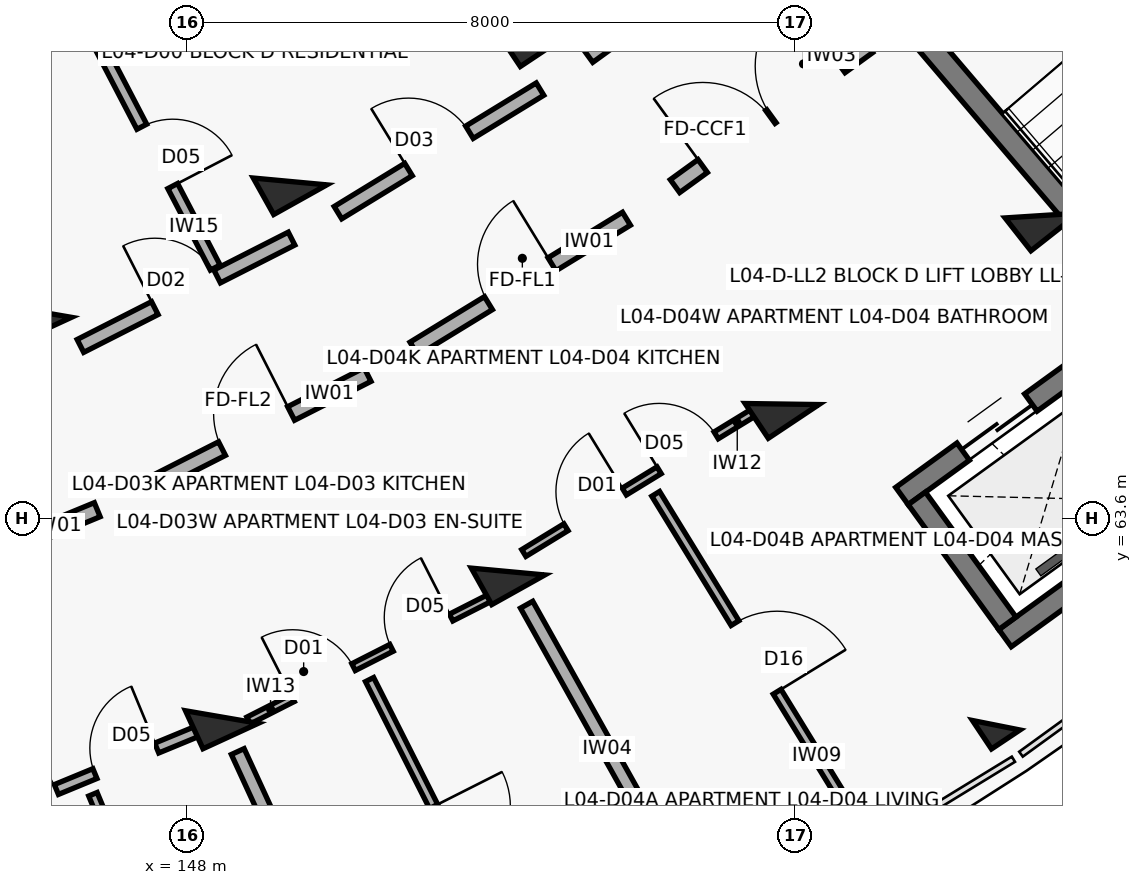
"""IFC4 building model, lengths in metres.
Left out: names, types, materials, properties, quantities, classifications, styles, units other than length and angle.
Written with IfcOpenShell. Run it as: python <this file> out.ifc"""

import sys

from ifc_helpers import new_model, si_unit, direction, frame, frame_2d, origin, origin_2d, place, context, subcontext, project, spatial, rectangle, extrude, element, fill, save


model = new_model("IFC4")
c1 = context("Model", 3, precision=1e-05, world=origin(), true_north=direction((0.0, 1.0)))
c2 = subcontext(c1, "Body", "Model", "MODEL_VIEW")
j1 = project(units=[si_unit("LENGTHUNIT", "METRE"), si_unit("PLANEANGLEUNIT", "RADIAN")], contexts=[c1])
p1 = place(None, origin())
s1 = spatial("IfcSite", under=j1, at=p1, CompositionType="ELEMENT")
p2 = place(p1, origin())
s2 = spatial("IfcBuilding", under=s1, at=p2, CompositionType="ELEMENT")
p3 = place(p2, frame((0.0, 0.0, 14.3)))
s3 = spatial("IfcBuildingStorey", under=s2, at=p3, CompositionType="ELEMENT", Elevation=14.3)
for number, where, z_axis, x_axis in (
    (1, (146.004, 66.324, 0.0), (0.0, 0.0, 1.0), (0.418, -0.909, 0.0)),
    (2, (148.461, 60.982, 0.0), (0.0, 0.0, 1.0), (0.418, -0.909, 0.0)),
    (3, (149.358, 68.03, 0.0), (0.0, 0.0, 1.0), (0.488, -0.873, 0.0)),
    (4, (152.227, 62.897, 0.0), (0.0, 0.0, 1.0), (0.488, -0.873, 0.0)),
    (5, (152.568, 69.993, 0.0), (0.0, 0.0, 1.0), (0.555, -0.832, 0.0)),
    (6, (155.831, 65.101, 0.0), (0.0, 0.0, 1.0), (0.555, -0.832, 0.0)),
):
    element("IfcColumn", number, at=place(p3, frame(where, z_axis=z_axis, x_axis=x_axis)), inside=s3, PredefinedType="COLUMN", context=c2, shape_type="SweptSolid", body=[
        extrude(rectangle(XDim=0.55, YDim=0.8, at=origin_2d()), origin(), (0.0, 0.0, 1.0), 3.1),
    ])
p4 = place(p3, frame((158.649, 60.875, 0.0), z_axis=(0.0, 0.0, 1.0), x_axis=(0.554844427448, -0.83195412213, 0.0)))
e7 = element("IfcColumn", 7, at=p4, inside=s3, PredefinedType="COLUMN", context=c2, shape_type="SweptSolid", body=[
    extrude(rectangle(XDim=0.45, YDim=0.45, at=origin_2d()), origin(), (0.0, 0.0, 1.0), 3.1),
])
p5 = place(p3, frame((159.25, 67.581, 0.0), z_axis=(0.0, 0.0, 1.0), x_axis=(0.618408395358, -0.785856893175, 0.0)))
e8 = element("IfcColumn", 8, at=p5, inside=s3, PredefinedType="COLUMN", context=c2, shape_type="SweptSolid", body=[
    extrude(rectangle(XDim=0.55, YDim=0.8, at=origin_2d()), origin(), (0.0, 0.0, 1.0), 3.1),
])
p6 = place(p3, frame((157.583, 70.041, 0.0), z_axis=(0.0, 0.0, 1.0), x_axis=(0.648762810187, -0.760990680704, 0.0)))
e9 = element("IfcWall", 9, at=p6, inside=s3, PredefinedType="SHEAR", context=c2, shape_type="SweptSolid", body=[
    extrude(rectangle(XDim=7.69, YDim=0.3, at=frame_2d((3.845, 0.0))), origin(), (0.0, 0.0, 1.0), 3.1),
])
p7 = place(p3, frame((157.409, 63.89, 0.0), z_axis=(0.0, 0.0, 1.0), x_axis=(0.809510936031, 0.587104798521, 0.0)))
e10 = element("IfcWall", 10, at=p7, inside=s3, PredefinedType="SHEAR", context=c2, shape_type="SweptSolid", body=[
    extrude(rectangle(XDim=3.09, YDim=0.28, at=frame_2d((1.545, 0.0))), origin(), (0.0, 0.0, 1.0), 3.1),
])
p8 = place(p7, frame((0.995, 0.0, 0.0)))
e11 = element("IfcOpeningElement", 11, at=p8, cuts=e10, PredefinedType="OPENING", context=c2, shape_type="SweptSolid", body=[
    extrude(rectangle(XDim=1.1, YDim=2.15, at=frame_2d((0.55, 1.075))), frame((0.0, 0.15, 0.0), z_axis=(0.0, -1.0, 0.0), x_axis=(1.0, 0.0, 0.0)), (0.0, 0.0, 1.0), 0.3),
])
p9 = place(p3, frame((158.765, 62.021, 0.0), z_axis=(0.0, 0.0, 1.0), x_axis=(0.809548485838, 0.587053020669, 0.0)))
e12 = element("IfcWall", 12, at=p9, inside=s3, PredefinedType="SHEAR", context=c2, shape_type="SweptSolid", body=[
    extrude(rectangle(XDim=3.09, YDim=0.28, at=frame_2d((1.545, 0.0))), origin(), (0.0, 0.0, 1.0), 3.1),
])
p10 = place(p3, frame((157.604, 63.859, 0.0), z_axis=(0.0, 0.0, 1.0), x_axis=(0.587127188998, -0.809494696671, 0.0)))
e13 = element("IfcWall", 13, at=p10, inside=s3, PredefinedType="SHEAR", context=c2, shape_type="SweptSolid", body=[
    extrude(rectangle(XDim=2.03, YDim=0.28, at=frame_2d((1.015, 0.0))), origin(), (0.0, 0.0, 1.0), 3.1),
])
p11 = place(p3, frame((143.793, 62.459, 0.0), z_axis=(0.0, 0.0, 1.0), x_axis=(0.924214561665, 0.381873596896, 0.0)))
e14 = element("IfcWall", 14, at=p11, inside=s3, PredefinedType="SOLIDWALL", context=c2, shape_type="SweptSolid", body=[
    extrude(rectangle(XDim=3.277, YDim=0.2, at=frame_2d((1.639, 0.0))), origin(), (0.0, 0.0, 1.0), 2.08),
])
p12 = place(p11, frame((1.148, 0.0, 0.0)))
e15 = element("IfcOpeningElement", 15, at=p12, cuts=e14, PredefinedType="OPENING", context=c2, shape_type="SweptSolid", body=[
    extrude(rectangle(XDim=0.98, YDim=2.15, at=frame_2d((0.49, 1.075))), frame((0.0, 0.11, 0.0), z_axis=(0.0, -1.0, 0.0), x_axis=(1.0, 0.0, 0.0)), (0.0, 0.0, 1.0), 0.22),
])
p13 = place(p3, frame((144.852, 59.437, 0.0), z_axis=(0.0, 0.0, 1.0), x_axis=(0.924217547919, 0.381866369453, 0.0)))
e16 = element("IfcWall", 16, at=p13, inside=s3, PredefinedType="PARTITIONING", context=c2, shape_type="SweptSolid", body=[
    extrude(rectangle(XDim=3.628, YDim=0.14, at=frame_2d((1.814, 0.0))), origin(), (0.0, 0.0, 1.0), 2.08),
])
p14 = place(p13, frame((0.65, 0.0, 0.0)))
e17 = element("IfcOpeningElement", 17, at=p14, cuts=e16, PredefinedType="OPENING", context=c2, shape_type="SweptSolid", body=[
    extrude(rectangle(XDim=0.9, YDim=2.1, at=frame_2d((0.45, 1.05))), frame((0.0, 0.08, 0.0), z_axis=(0.0, -1.0, 0.0), x_axis=(1.0, 0.0, 0.0)), (0.0, 0.0, 1.0), 0.16),
])
p15 = place(p13, frame((2.098, 0.0, 0.0)))
e18 = element("IfcOpeningElement", 18, at=p15, cuts=e16, PredefinedType="OPENING", context=c2, shape_type="SweptSolid", body=[
    extrude(rectangle(XDim=0.88, YDim=2.1, at=frame_2d((0.44, 1.05))), frame((0.0, 0.08, 0.0), z_axis=(0.0, -1.0, 0.0), x_axis=(1.0, 0.0, 0.0)), (0.0, 0.0, 1.0), 0.16),
])
p16 = place(p3, frame((146.765, 59.966, 0.0), z_axis=(0.0, 0.0, 1.0), x_axis=(0.384548164276, -0.923104928679, 0.0)))
e19 = element("IfcWall", 19, at=p16, inside=s3, PredefinedType="PARTITIONING", context=c2, shape_type="SweptSolid", body=[
    extrude(rectangle(XDim=4.9, YDim=0.12, at=frame_2d((2.45, 0.0))), origin(), (0.0, 0.0, 1.0), 2.08),
])
p17 = place(p16, frame((1.965, 0.0, 0.0)))
e20 = element("IfcOpeningElement", 20, at=p17, cuts=e19, PredefinedType="OPENING", context=c2, shape_type="SweptSolid", body=[
    extrude(rectangle(XDim=0.97, YDim=2.1, at=frame_2d((0.485, 1.05))), frame((0.0, 0.07, 0.0), z_axis=(0.0, -1.0, 0.0), x_axis=(1.0, 0.0, 0.0)), (0.0, 0.0, 1.0), 0.14),
])
p18 = place(p3, frame((147.457, 64.003, 0.0), z_axis=(0.0, 0.0, 1.0), x_axis=(0.891412167565, 0.45319349898, 0.0)))
e21 = element("IfcWall", 21, at=p18, inside=s3, PredefinedType="SOLIDWALL", context=c2, shape_type="SweptSolid", body=[
    extrude(rectangle(XDim=3.277, YDim=0.2, at=frame_2d((1.639, 0.0))), origin(), (0.0, 0.0, 1.0), 2.08),
])
p19 = place(p18, frame((1.128, 0.0, 0.0)))
e22 = element("IfcOpeningElement", 22, at=p19, cuts=e21, PredefinedType="OPENING", context=c2, shape_type="SweptSolid", body=[
    extrude(rectangle(XDim=1.02, YDim=2.15, at=frame_2d((0.51, 1.075))), frame((0.0, 0.11, 0.0), z_axis=(0.0, -1.0, 0.0), x_axis=(1.0, 0.0, 0.0)), (0.0, 0.0, 1.0), 0.22),
])
p20 = place(p3, frame((146.6, 65.865, 0.0), z_axis=(0.0, 0.0, 1.0), x_axis=(0.891414101388, 0.453189695212, 0.0)))
e23 = element("IfcWall", 23, at=p20, inside=s3, PredefinedType="SOLIDWALL", context=c2, shape_type="SweptSolid", body=[
    extrude(rectangle(XDim=3.116, YDim=0.19, at=frame_2d((1.558, 0.0))), origin(), (0.0, 0.0, 1.0), 2.08),
])
p21 = place(p20, frame((1.098, 0.0, 0.0)))
e24 = element("IfcOpeningElement", 24, at=p21, cuts=e23, PredefinedType="OPENING", context=c2, shape_type="SweptSolid", body=[
    extrude(rectangle(XDim=0.92, YDim=2.1, at=frame_2d((0.46, 1.05))), frame((0.0, 0.105, 0.0), z_axis=(0.0, -1.0, 0.0), x_axis=(1.0, 0.0, 0.0)), (0.0, 0.0, 1.0), 0.21),
])
p22 = place(p3, frame((146.849, 69.822, 0.0), z_axis=(0.0, 0.0, 1.0), x_axis=(0.462242343884, -0.886753638572, 0.0)))
e25 = element("IfcWall", 25, at=p22, inside=s3, PredefinedType="PARTITIONING", context=c2, shape_type="SweptSolid", body=[
    extrude(rectangle(XDim=3.3, YDim=0.145, at=frame_2d((1.65, 0.0))), origin(), (0.0, 0.0, 1.0), 2.08),
])
p23 = place(p22, frame((1.21, 0.0, 0.0)))
e26 = element("IfcOpeningElement", 26, at=p23, cuts=e25, PredefinedType="OPENING", context=c2, shape_type="SweptSolid", body=[
    extrude(rectangle(XDim=0.88, YDim=2.1, at=frame_2d((0.44, 1.05))), frame((0.0, 0.083, 0.0), z_axis=(0.0, -1.0, 0.0), x_axis=(1.0, 0.0, 0.0)), (0.0, 0.0, 1.0), 0.165),
])
p24 = place(p3, frame((148.812, 60.937, 0.0), z_axis=(0.0, 0.0, 1.0), x_axis=(0.89140212369, 0.453213254309, 0.0)))
e27 = element("IfcWall", 27, at=p24, inside=s3, PredefinedType="PARTITIONING", context=c2, shape_type="SweptSolid", body=[
    extrude(rectangle(XDim=3.64, YDim=0.1, at=frame_2d((1.82, 0.0))), origin(), (0.0, 0.0, 1.0), 2.08),
])
p25 = place(p24, frame((0.65, 0.0, 0.0)))
e28 = element("IfcOpeningElement", 28, at=p25, cuts=e27, PredefinedType="OPENING", context=c2, shape_type="SweptSolid", body=[
    extrude(rectangle(XDim=0.9, YDim=2.1, at=frame_2d((0.45, 1.05))), frame((0.0, 0.06, 0.0), z_axis=(0.0, -1.0, 0.0), x_axis=(1.0, 0.0, 0.0)), (0.0, 0.0, 1.0), 0.12),
])
p26 = place(p24, frame((2.11, 0.0, 0.0)))
e29 = element("IfcOpeningElement", 29, at=p26, cuts=e27, PredefinedType="OPENING", context=c2, shape_type="SweptSolid", body=[
    extrude(rectangle(XDim=0.88, YDim=2.1, at=frame_2d((0.44, 1.05))), frame((0.0, 0.06, 0.0), z_axis=(0.0, -1.0, 0.0), x_axis=(1.0, 0.0, 0.0)), (0.0, 0.0, 1.0), 0.12),
])
p27 = place(p3, frame((150.404, 61.475, 0.0), z_axis=(0.0, 0.0, 1.0), x_axis=(0.450664257057, -0.892693523787, 0.0)))
e30 = element("IfcWall", 30, at=p27, inside=s3, PredefinedType="PARTITIONING", context=c2, shape_type="SweptSolid", body=[
    extrude(rectangle(XDim=4.75, YDim=0.12, at=frame_2d((2.375, 0.0))), origin(), (0.0, 0.0, 1.0), 2.08),
])
p28 = place(p27, frame((1.87, 0.0, 0.0)))
e31 = element("IfcOpeningElement", 31, at=p28, cuts=e30, PredefinedType="OPENING", context=c2, shape_type="SweptSolid", body=[
    extrude(rectangle(XDim=1.01, YDim=2.1, at=frame_2d((0.505, 1.05))), frame((0.0, 0.07, 0.0), z_axis=(0.0, -1.0, 0.0), x_axis=(1.0, 0.0, 0.0)), (0.0, 0.0, 1.0), 0.14),
])
p29 = place(p3, frame((148.67, 60.528, 0.0), z_axis=(0.0, 0.0, 1.0), x_axis=(0.417837051164, -0.908521985796, 0.0)))
e32 = element("IfcWall", 32, at=p29, inside=s3, PredefinedType="SOLIDWALL", context=c2, shape_type="SweptSolid", body=[
    extrude(rectangle(XDim=4.35, YDim=0.185, at=frame_2d((2.175, 0.0))), origin(), (0.0, 0.0, 1.0), 2.08),
])
p30 = place(p3, frame((150.989, 65.829, 0.0), z_axis=(0.0, 0.0, 1.0), x_axis=(0.853090237845, 0.521763400492, 0.0)))
e33 = element("IfcWall", 33, at=p30, inside=s3, PredefinedType="SOLIDWALL", context=c2, shape_type="SweptSolid", body=[
    extrude(rectangle(XDim=3.277, YDim=0.2, at=frame_2d((1.638, 0.0))), origin(), (0.0, 0.0, 1.0), 2.08),
])
p31 = place(p30, frame((1.148, 0.0, 0.0)))
e34 = element("IfcOpeningElement", 34, at=p31, cuts=e33, PredefinedType="OPENING", context=c2, shape_type="SweptSolid", body=[
    extrude(rectangle(XDim=0.98, YDim=2.15, at=frame_2d((0.49, 1.075))), frame((0.0, 0.11, 0.0), z_axis=(0.0, -1.0, 0.0), x_axis=(1.0, 0.0, 0.0)), (0.0, 0.0, 1.0), 0.22),
])
p32 = place(p3, frame((149.989, 67.619, 0.0), z_axis=(0.0, 0.0, 1.0), x_axis=(0.853121049608, 0.5217130195, 0.0)))
e35 = element("IfcWall", 35, at=p32, inside=s3, PredefinedType="SOLIDWALL", context=c2, shape_type="SweptSolid", body=[
    extrude(rectangle(XDim=3.116, YDim=0.19, at=frame_2d((1.558, 0.0))), origin(), (0.0, 0.0, 1.0), 2.08),
])
p33 = place(p32, frame((1.088, 0.0, 0.0)))
e36 = element("IfcOpeningElement", 36, at=p33, cuts=e35, PredefinedType="OPENING", context=c2, shape_type="SweptSolid", body=[
    extrude(rectangle(XDim=0.94, YDim=2.1, at=frame_2d((0.47, 1.05))), frame((0.0, 0.105, 0.0), z_axis=(0.0, -1.0, 0.0), x_axis=(1.0, 0.0, 0.0)), (0.0, 0.0, 1.0), 0.21),
])
p34 = place(p3, frame((152.434, 63.141, 0.0), z_axis=(0.0, 0.0, 1.0), x_axis=(0.853089873067, 0.521763996909, 0.0)))
e37 = element("IfcWall", 37, at=p34, inside=s3, PredefinedType="PARTITIONING", context=c2, shape_type="SweptSolid", body=[
    extrude(rectangle(XDim=3.616, YDim=0.105, at=frame_2d((1.808, 0.0))), origin(), (0.0, 0.0, 1.0), 2.08),
])
p35 = place(p34, frame((0.65, 0.0, 0.0)))
e38 = element("IfcOpeningElement", 38, at=p35, cuts=e37, PredefinedType="OPENING", context=c2, shape_type="SweptSolid", body=[
    extrude(rectangle(XDim=0.9, YDim=2.1, at=frame_2d((0.45, 1.05))), frame((0.0, 0.062, 0.0), z_axis=(0.0, -1.0, 0.0), x_axis=(1.0, 0.0, 0.0)), (0.0, 0.0, 1.0), 0.125),
])
p36 = place(p34, frame((2.086, 0.0, 0.0)))
e39 = element("IfcOpeningElement", 39, at=p36, cuts=e37, PredefinedType="OPENING", context=c2, shape_type="SweptSolid", body=[
    extrude(rectangle(XDim=0.88, YDim=2.1, at=frame_2d((0.44, 1.05))), frame((0.0, 0.062, 0.0), z_axis=(0.0, -1.0, 0.0), x_axis=(1.0, 0.0, 0.0)), (0.0, 0.0, 1.0), 0.125),
])
p37 = place(p3, frame((154.169, 63.919, 0.0), z_axis=(0.0, 0.0, 1.0), x_axis=(0.522980301869, -0.852344768188, 0.0)))
e40 = element("IfcWall", 40, at=p37, inside=s3, PredefinedType="PARTITIONING", context=c2, shape_type="SweptSolid", body=[
    extrude(rectangle(XDim=5.05, YDim=0.12, at=frame_2d((2.525, 0.0))), origin(), (0.0, 0.0, 1.0), 2.08),
])
p38 = place(p37, frame((1.995, 0.0, 0.0)))
e41 = element("IfcOpeningElement", 41, at=p38, cuts=e40, PredefinedType="OPENING", context=c2, shape_type="SweptSolid", body=[
    extrude(rectangle(XDim=1.06, YDim=2.1, at=frame_2d((0.53, 1.05))), frame((0.0, 0.07, 0.0), z_axis=(0.0, -1.0, 0.0), x_axis=(1.0, 0.0, 0.0)), (0.0, 0.0, 1.0), 0.14),
])
p39 = place(p3, frame((152.471, 62.46, 0.0), z_axis=(0.0, 0.0, 1.0), x_axis=(0.487866639184, -0.872918176218, 0.0)))
e42 = element("IfcWall", 42, at=p39, inside=s3, PredefinedType="SOLIDWALL", context=c2, shape_type="SweptSolid", body=[
    extrude(rectangle(XDim=4.35, YDim=0.185, at=frame_2d((2.175, 0.0))), origin(), (0.0, 0.0, 1.0), 2.08),
])
p40 = place(p3, frame((154.423, 67.968, 0.0), z_axis=(0.0, 0.0, 1.0), x_axis=(0.809516127005, 0.587097641043, 0.0)))
e43 = element("IfcWall", 43, at=p40, inside=s3, PredefinedType="SOLIDWALL", context=c2, shape_type="SweptSolid", body=[
    extrude(rectangle(XDim=3.137, YDim=0.21, at=frame_2d((1.569, 0.0))), origin(), (0.0, 0.0, 1.0), 2.08),
])
p41 = place(p40, frame((0.45, 0.0, 0.0)))
e44 = element("IfcOpeningElement", 44, at=p41, cuts=e43, PredefinedType="OPENING", context=c2, shape_type="SweptSolid", body=[
    extrude(rectangle(XDim=1.1, YDim=2.15, at=frame_2d((0.55, 1.075))), frame((0.0, 0.115, 0.0), z_axis=(0.0, -1.0, 0.0), x_axis=(1.0, 0.0, 0.0)), (0.0, 0.0, 1.0), 0.23),
])
p42 = place(p40, frame((1.567, 0.0, 0.0)))
e45 = element("IfcOpeningElement", 45, at=p42, cuts=e43, PredefinedType="OPENING", context=c2, shape_type="SweptSolid", body=[
    extrude(rectangle(XDim=1.12, YDim=2.15, at=frame_2d((0.56, 1.075))), frame((0.0, 0.115, 0.0), z_axis=(0.0, -1.0, 0.0), x_axis=(1.0, 0.0, 0.0)), (0.0, 0.0, 1.0), 0.23),
])
p43 = place(p3, frame((153.285, 69.674, 0.0), z_axis=(0.0, 0.0, 1.0), x_axis=(0.809505174959, 0.587112741911, 0.0)))
e46 = element("IfcWall", 46, at=p43, inside=s3, PredefinedType="SOLIDWALL", context=c2, shape_type="SweptSolid", body=[
    extrude(rectangle(XDim=2.976, YDim=0.19, at=frame_2d((1.488, 0.0))), origin(), (0.0, 0.0, 1.0), 2.08),
])
p44 = place(p43, frame((0.928, 0.0, 0.0)))
e47 = element("IfcOpeningElement", 47, at=p44, cuts=e46, PredefinedType="OPENING", context=c2, shape_type="SweptSolid", body=[
    extrude(rectangle(XDim=1.12, YDim=2.15, at=frame_2d((0.56, 1.075))), frame((0.0, 0.105, 0.0), z_axis=(0.0, -1.0, 0.0), x_axis=(1.0, 0.0, 0.0)), (0.0, 0.0, 1.0), 0.21),
])
p45 = place(p8, origin())
e48 = element("IfcDoor", 48, at=p45, inside=s3, OperationType="DOUBLE_DOOR_SLIDING", PredefinedType="DOOR", context=c2, shape_type="SweptSolid", body=[
    extrude(rectangle(XDim=1.1, YDim=2.15, at=frame_2d((0.55, 1.075))), frame((0.0, 0.025, 0.0), z_axis=(0.0, -1.0, 0.0), x_axis=(1.0, 0.0, 0.0)), (0.0, 0.0, 1.0), 0.05),
])
fill(e11, e48)
p46 = place(p14, origin())
e49 = element("IfcDoor", 49, at=p46, inside=s3, OperationType="SINGLE_SWING_LEFT", PredefinedType="DOOR", context=c2, shape_type="SweptSolid", body=[
    extrude(rectangle(XDim=0.9, YDim=2.1, at=frame_2d((0.45, 1.05))), frame((0.0, 0.025, 0.0), z_axis=(0.0, -1.0, 0.0), x_axis=(1.0, 0.0, 0.0)), (0.0, 0.0, 1.0), 0.05),
])
fill(e17, e49)
p47 = place(p15, origin())
e50 = element("IfcDoor", 50, at=p47, inside=s3, OperationType="SINGLE_SWING_RIGHT", PredefinedType="DOOR", context=c2, shape_type="SweptSolid", body=[
    extrude(rectangle(XDim=0.88, YDim=2.1, at=frame_2d((0.44, 1.05))), frame((0.0, 0.025, 0.0), z_axis=(0.0, -1.0, 0.0), x_axis=(1.0, 0.0, 0.0)), (0.0, 0.0, 1.0), 0.05),
])
fill(e18, e50)
p48 = place(p19, origin())
e51 = element("IfcDoor", 51, at=p48, inside=s3, OperationType="SINGLE_SWING_RIGHT", PredefinedType="DOOR", context=c2, shape_type="SweptSolid", body=[
    extrude(rectangle(XDim=1.02, YDim=2.15, at=frame_2d((0.51, 1.075))), frame((0.0, 0.025, 0.0), z_axis=(0.0, -1.0, 0.0), x_axis=(1.0, 0.0, 0.0)), (0.0, 0.0, 1.0), 0.05),
])
fill(e22, e51)
p49 = place(p21, origin())
e52 = element("IfcDoor", 52, at=p49, inside=s3, OperationType="SINGLE_SWING_LEFT", PredefinedType="DOOR", context=c2, shape_type="SweptSolid", body=[
    extrude(rectangle(XDim=0.92, YDim=2.1, at=frame_2d((0.46, 1.05))), frame((0.0, 0.025, 0.0), z_axis=(0.0, -1.0, 0.0), x_axis=(1.0, 0.0, 0.0)), (0.0, 0.0, 1.0), 0.05),
])
fill(e24, e52)
p50 = place(p23, origin())
e53 = element("IfcDoor", 53, at=p50, inside=s3, OperationType="SINGLE_SWING_RIGHT", PredefinedType="DOOR", context=c2, shape_type="SweptSolid", body=[
    extrude(rectangle(XDim=0.88, YDim=2.1, at=frame_2d((0.44, 1.05))), frame((0.0, 0.025, 0.0), z_axis=(0.0, -1.0, 0.0), x_axis=(1.0, 0.0, 0.0)), (0.0, 0.0, 1.0), 0.05),
])
fill(e26, e53)
p51 = place(p25, origin())
e54 = element("IfcDoor", 54, at=p51, inside=s3, OperationType="SINGLE_SWING_LEFT", PredefinedType="DOOR", context=c2, shape_type="SweptSolid", body=[
    extrude(rectangle(XDim=0.9, YDim=2.1, at=frame_2d((0.45, 1.05))), frame((0.0, 0.025, 0.0), z_axis=(0.0, -1.0, 0.0), x_axis=(1.0, 0.0, 0.0)), (0.0, 0.0, 1.0), 0.05),
])
fill(e28, e54)
p52 = place(p26, origin())
e55 = element("IfcDoor", 55, at=p52, inside=s3, OperationType="SINGLE_SWING_RIGHT", PredefinedType="DOOR", context=c2, shape_type="SweptSolid", body=[
    extrude(rectangle(XDim=0.88, YDim=2.1, at=frame_2d((0.44, 1.05))), frame((0.0, 0.025, 0.0), z_axis=(0.0, -1.0, 0.0), x_axis=(1.0, 0.0, 0.0)), (0.0, 0.0, 1.0), 0.05),
])
fill(e29, e55)
p53 = place(p31, origin())
e56 = element("IfcDoor", 56, at=p53, inside=s3, OperationType="SINGLE_SWING_RIGHT", PredefinedType="DOOR", context=c2, shape_type="SweptSolid", body=[
    extrude(rectangle(XDim=0.98, YDim=2.15, at=frame_2d((0.49, 1.075))), frame((0.0, 0.025, 0.0), z_axis=(0.0, -1.0, 0.0), x_axis=(1.0, 0.0, 0.0)), (0.0, 0.0, 1.0), 0.05),
])
fill(e34, e56)
p54 = place(p33, origin())
e57 = element("IfcDoor", 57, at=p54, inside=s3, OperationType="SINGLE_SWING_LEFT", PredefinedType="DOOR", context=c2, shape_type="SweptSolid", body=[
    extrude(rectangle(XDim=0.94, YDim=2.1, at=frame_2d((0.47, 1.05))), frame((0.0, 0.025, 0.0), z_axis=(0.0, -1.0, 0.0), x_axis=(1.0, 0.0, 0.0)), (0.0, 0.0, 1.0), 0.05),
])
fill(e36, e57)
p55 = place(p35, origin())
e58 = element("IfcDoor", 58, at=p55, inside=s3, OperationType="SINGLE_SWING_RIGHT", PredefinedType="DOOR", context=c2, shape_type="SweptSolid", body=[
    extrude(rectangle(XDim=0.9, YDim=2.1, at=frame_2d((0.45, 1.05))), frame((0.0, 0.025, 0.0), z_axis=(0.0, -1.0, 0.0), x_axis=(1.0, 0.0, 0.0)), (0.0, 0.0, 1.0), 0.05),
])
fill(e38, e58)
p56 = place(p36, origin())
e59 = element("IfcDoor", 59, at=p56, inside=s3, OperationType="SINGLE_SWING_LEFT", PredefinedType="DOOR", context=c2, shape_type="SweptSolid", body=[
    extrude(rectangle(XDim=0.88, YDim=2.1, at=frame_2d((0.44, 1.05))), frame((0.0, 0.025, 0.0), z_axis=(0.0, -1.0, 0.0), x_axis=(1.0, 0.0, 0.0)), (0.0, 0.0, 1.0), 0.05),
])
fill(e39, e59)
p57 = place(p38, origin())
e60 = element("IfcDoor", 60, at=p57, inside=s3, OperationType="SINGLE_SWING_RIGHT", PredefinedType="DOOR", context=c2, shape_type="SweptSolid", body=[
    extrude(rectangle(XDim=1.06, YDim=2.1, at=frame_2d((0.53, 1.05))), frame((0.0, 0.025, 0.0), z_axis=(0.0, -1.0, 0.0), x_axis=(1.0, 0.0, 0.0)), (0.0, 0.0, 1.0), 0.05),
])
fill(e41, e60)
p58 = place(p41, origin())
e61 = element("IfcDoor", 61, at=p58, inside=s3, OperationType="SINGLE_SWING_LEFT", PredefinedType="DOOR", context=c2, shape_type="SweptSolid", body=[
    extrude(rectangle(XDim=1.1, YDim=2.15, at=frame_2d((0.55, 1.075))), frame((0.0, 0.025, 0.0), z_axis=(0.0, -1.0, 0.0), x_axis=(1.0, 0.0, 0.0)), (0.0, 0.0, 1.0), 0.05),
])
fill(e44, e61)
p59 = place(p42, origin())
e62 = element("IfcDoor", 62, at=p59, inside=s3, OperationType="SINGLE_SWING_RIGHT", PredefinedType="DOOR", context=c2, shape_type="SweptSolid", body=[
    extrude(rectangle(XDim=1.12, YDim=2.15, at=frame_2d((0.56, 1.075))), frame((0.0, 0.025, 0.0), z_axis=(0.0, -1.0, 0.0), x_axis=(1.0, 0.0, 0.0)), (0.0, 0.0, 1.0), 0.05),
])
fill(e45, e62)
save(model, sys.argv[1])
